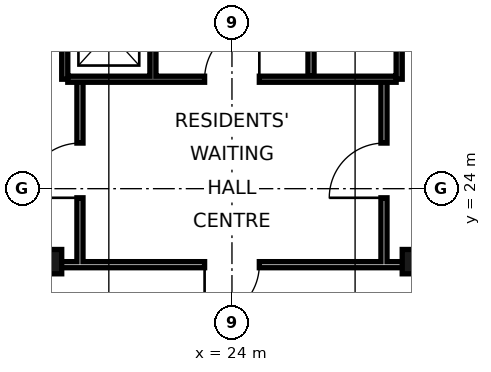
"""IFC4 building model, lengths in metres.
Left out: names, types, materials, properties, quantities, classifications, styles, units other than length and angle.
Written with IfcOpenShell. Run it as: python <this file> out.ifc"""

import sys

from ifc_helpers import new_model, si_unit, direction, frame, frame_2d, origin, origin_2d, place, context, subcontext, project, spatial, rectangle, hollow_rectangle, extrude, element, fill, save


model = new_model("IFC4")
c1 = context("Model", 3, precision=1e-05, world=origin(), true_north=direction((0.0, 1.0)))
c2 = subcontext(c1, "Body", "Model", "MODEL_VIEW")
j1 = project(units=[si_unit("LENGTHUNIT", "METRE"), si_unit("PLANEANGLEUNIT", "RADIAN")], contexts=[c1])
p1 = place(None, origin())
s1 = spatial("IfcSite", under=j1, at=p1, CompositionType="ELEMENT")
p2 = place(p1, origin())
s2 = spatial("IfcBuilding", under=s1, at=p2, CompositionType="ELEMENT")
p3 = place(p2, origin())
s3 = spatial("IfcBuildingStorey", under=s2, at=p3, CompositionType="ELEMENT", Elevation=0.0)
for number, where, z_axis, x_axis in (
    (1, (18.0, 21.6, 0.0), (0.0, 0.0, 1.0), (1.0, 0.0, 0.0)),
    (2, (30.0, 21.6, 0.0), (0.0, 0.0, 1.0), (1.0, 0.0, 0.0)),
):
    element("IfcColumn", number, at=place(p3, frame(where, z_axis=z_axis, x_axis=x_axis)), inside=s3, PredefinedType="COLUMN", context=c2, shape_type="SweptSolid", body=[
        extrude(hollow_rectangle(XDim=0.8, YDim=0.8, WallThickness=0.07, at=origin_2d()), origin(), (0.0, 0.0, 1.0), 15.0),
    ])
for number, where, z_axis, x_axis in (
    (3, (18.5, 27.6, 0.0), (0.0, 0.0, 1.0), (0.0, 1.0, 0.0)),
    (4, (29.5, 27.6, 0.0), (0.0, 0.0, 1.0), (0.0, 1.0, 0.0)),
):
    element("IfcWall", number, at=place(p3, frame(where, z_axis=z_axis, x_axis=x_axis)), inside=s3, PredefinedType="SOLIDWALL", context=c2, shape_type="SweptSolid", body=[
        extrude(rectangle(XDim=17.5, YDim=0.2, at=frame_2d((8.75, 0.0))), origin(), (0.0, 0.0, 1.0), 14.55),
    ])
p4 = place(p3, frame((12.1, 21.5, 0.0), z_axis=(0.0, 0.0, 1.0), x_axis=(1.0, 0.0, 0.0)))
e5 = element("IfcWall", 5, at=p4, inside=s3, PredefinedType="SOLIDWALL", context=c2, shape_type="SweptSolid", body=[
    extrude(rectangle(XDim=23.8, YDim=0.2, at=frame_2d((11.9, 0.0))), origin(), (0.0, 0.0, 1.0), 13.85),
])
p5 = place(p4, frame((2.0, 0.0, 0.0)))
e6 = element("IfcOpeningElement", 6, at=p5, cuts=e5, PredefinedType="OPENING", context=c2, shape_type="SweptSolid", body=[
    extrude(rectangle(XDim=1.8, YDim=2.1, at=frame_2d((0.9, 1.05))), frame((0.0, 0.11, 0.0), z_axis=(0.0, -1.0, 0.0), x_axis=(1.0, 0.0, 0.0)), (0.0, 0.0, 1.0), 0.22),
])
p6 = place(p4, frame((11.0, 0.0, 0.0)))
e7 = element("IfcOpeningElement", 7, at=p6, cuts=e5, PredefinedType="OPENING", context=c2, shape_type="SweptSolid", body=[
    extrude(rectangle(XDim=1.8, YDim=2.1, at=frame_2d((0.9, 1.05))), frame((0.0, 0.11, 0.0), z_axis=(0.0, -1.0, 0.0), x_axis=(1.0, 0.0, 0.0)), (0.0, 0.0, 1.0), 0.22),
])
p7 = place(p4, frame((20.0, 0.0, 0.0)))
e8 = element("IfcOpeningElement", 8, at=p7, cuts=e5, PredefinedType="OPENING", context=c2, shape_type="SweptSolid", body=[
    extrude(rectangle(XDim=1.8, YDim=2.1, at=frame_2d((0.9, 1.05))), frame((0.0, 0.11, 0.0), z_axis=(0.0, -1.0, 0.0), x_axis=(1.0, 0.0, 0.0)), (0.0, 0.0, 1.0), 0.22),
])
p8 = place(p3, frame((19.0, 21.6, 0.0), z_axis=(0.0, 0.0, 1.0), x_axis=(0.0, 1.0, 0.0)))
e9 = element("IfcWall", 9, at=p8, inside=s3, PredefinedType="PARTITIONING", context=c2, shape_type="SweptSolid", body=[
    extrude(rectangle(XDim=6.0, YDim=0.2, at=frame_2d((3.0, 0.0))), origin(), (0.0, 0.0, 1.0), 13.85),
])
p9 = place(p8, frame((2.1, 0.0, 0.0)))
e10 = element("IfcOpeningElement", 10, at=p9, cuts=e9, PredefinedType="OPENING", context=c2, shape_type="SweptSolid", body=[
    extrude(rectangle(XDim=1.8, YDim=2.1, at=frame_2d((0.9, 1.05))), frame((0.0, 0.11, 0.0), z_axis=(0.0, -1.0, 0.0), x_axis=(1.0, 0.0, 0.0)), (0.0, 0.0, 1.0), 0.22),
])
p10 = place(p3, frame((29.0, 21.6, 0.0), z_axis=(0.0, 0.0, 1.0), x_axis=(0.0, 1.0, 0.0)))
e11 = element("IfcWall", 11, at=p10, inside=s3, PredefinedType="PARTITIONING", context=c2, shape_type="SweptSolid", body=[
    extrude(rectangle(XDim=6.0, YDim=0.2, at=frame_2d((3.0, 0.0))), origin(), (0.0, 0.0, 1.0), 13.85),
])
p11 = place(p10, frame((2.1, 0.0, 0.0)))
e12 = element("IfcOpeningElement", 12, at=p11, cuts=e11, PredefinedType="OPENING", context=c2, shape_type="SweptSolid", body=[
    extrude(rectangle(XDim=1.8, YDim=2.1, at=frame_2d((0.9, 1.05))), frame((0.0, 0.11, 0.0), z_axis=(0.0, -1.0, 0.0), x_axis=(1.0, 0.0, 0.0)), (0.0, 0.0, 1.0), 0.22),
])
p12 = place(p3, frame((21.4, 27.7, 0.0), z_axis=(0.0, 0.0, 1.0), x_axis=(0.0, 1.0, 0.0)))
e13 = element("IfcWall", 13, at=p12, inside=s3, PredefinedType="SOLIDWALL", context=c2, shape_type="SweptSolid", body=[
    extrude(rectangle(XDim=17.3, YDim=0.2, at=frame_2d((8.65, 0.0))), origin(), (0.0, 0.0, 1.0), 14.55),
])
p13 = place(p12, frame((0.9, 0.0, 0.0)))
e14 = element("IfcOpeningElement", 14, at=p13, cuts=e13, PredefinedType="OPENING", context=c2, shape_type="SweptSolid", body=[
    extrude(rectangle(XDim=1.1, YDim=2.1, at=frame_2d((0.55, 1.05))), frame((0.0, 0.11, 0.0), z_axis=(0.0, -1.0, 0.0), x_axis=(1.0, 0.0, 0.0)), (0.0, 0.0, 1.0), 0.22),
])
p14 = place(p12, frame((4.0, 0.0, 0.0)))
e15 = element("IfcOpeningElement", 15, at=p14, cuts=e13, PredefinedType="OPENING", context=c2, shape_type="SweptSolid", body=[
    extrude(rectangle(XDim=1.1, YDim=2.1, at=frame_2d((0.55, 1.05))), frame((0.0, 0.11, 0.0), z_axis=(0.0, -1.0, 0.0), x_axis=(1.0, 0.0, 0.0)), (0.0, 0.0, 1.0), 0.22),
])
p15 = place(p12, frame((16.0, 0.0, 0.0)))
e16 = element("IfcOpeningElement", 16, at=p15, cuts=e13, PredefinedType="OPENING", context=c2, shape_type="SweptSolid", body=[
    extrude(rectangle(XDim=1.0, YDim=2.1, at=frame_2d((0.5, 1.05))), frame((0.0, 0.11, 0.0), z_axis=(0.0, -1.0, 0.0), x_axis=(1.0, 0.0, 0.0)), (0.0, 0.0, 1.0), 0.22),
])
p16 = place(p12, frame((7.2, 0.0, 0.0)))
e17 = element("IfcOpeningElement", 17, at=p16, cuts=e13, PredefinedType="OPENING", context=c2, shape_type="SweptSolid", body=[
    extrude(rectangle(XDim=0.9, YDim=2.1, at=frame_2d((0.45, 1.05))), frame((0.0, 0.11, 0.0), z_axis=(0.0, -1.0, 0.0), x_axis=(1.0, 0.0, 0.0)), (0.0, 0.0, 1.0), 0.22),
])
p17 = place(p3, frame((26.6, 27.7, 0.0), z_axis=(0.0, 0.0, 1.0), x_axis=(0.0, 1.0, 0.0)))
e18 = element("IfcWall", 18, at=p17, inside=s3, PredefinedType="SOLIDWALL", context=c2, shape_type="SweptSolid", body=[
    extrude(rectangle(XDim=17.3, YDim=0.2, at=frame_2d((8.65, 0.0))), origin(), (0.0, 0.0, 1.0), 14.55),
])
p18 = place(p17, frame((4.1, 0.0, 0.0)))
e19 = element("IfcOpeningElement", 19, at=p18, cuts=e18, PredefinedType="OPENING", context=c2, shape_type="SweptSolid", body=[
    extrude(rectangle(XDim=0.9, YDim=2.1, at=frame_2d((0.45, 1.05))), frame((0.0, 0.11, 0.0), z_axis=(0.0, -1.0, 0.0), x_axis=(1.0, 0.0, 0.0)), (0.0, 0.0, 1.0), 0.22),
])
p19 = place(p17, frame((10.15, 0.0, 0.0)))
e20 = element("IfcOpeningElement", 20, at=p19, cuts=e18, PredefinedType="OPENING", context=c2, shape_type="SweptSolid", body=[
    extrude(rectangle(XDim=1.0, YDim=2.1, at=frame_2d((0.5, 1.05))), frame((0.0, 0.11, 0.0), z_axis=(0.0, -1.0, 0.0), x_axis=(1.0, 0.0, 0.0)), (0.0, 0.0, 1.0), 0.22),
])
p20 = place(p17, frame((15.275, 0.0, 0.0)))
e21 = element("IfcOpeningElement", 21, at=p20, cuts=e18, PredefinedType="OPENING", context=c2, shape_type="SweptSolid", body=[
    extrude(rectangle(XDim=1.0, YDim=2.1, at=frame_2d((0.5, 1.05))), frame((0.0, 0.11, 0.0), z_axis=(0.0, -1.0, 0.0), x_axis=(1.0, 0.0, 0.0)), (0.0, 0.0, 1.0), 0.22),
])
p21 = place(p3, frame((18.6, 27.6, 0.0), z_axis=(0.0, 0.0, 1.0), x_axis=(1.0, 0.0, 0.0)))
e22 = element("IfcWall", 22, at=p21, inside=s3, PredefinedType="SOLIDWALL", context=c2, shape_type="SweptSolid", body=[
    extrude(rectangle(XDim=10.8, YDim=0.2, at=frame_2d((5.4, 0.0))), origin(), (0.0, 0.0, 1.0), 14.55),
])
p22 = place(p21, frame((4.5, 0.0, 0.0)))
e23 = element("IfcOpeningElement", 23, at=p22, cuts=e22, PredefinedType="OPENING", context=c2, shape_type="SweptSolid", body=[
    extrude(rectangle(XDim=1.8, YDim=2.1, at=frame_2d((0.9, 1.05))), frame((0.0, 0.11, 0.0), z_axis=(0.0, -1.0, 0.0), x_axis=(1.0, 0.0, 0.0)), (0.0, 0.0, 1.0), 0.22),
])
p23 = place(p9, origin())
e24 = element("IfcDoor", 24, at=p23, inside=s3, OperationType="SINGLE_SWING_LEFT", PredefinedType="DOOR", context=c2, shape_type="SweptSolid", body=[
    extrude(rectangle(XDim=1.8, YDim=2.1, at=frame_2d((0.9, 1.05))), frame((0.0, 0.025, 0.0), z_axis=(0.0, -1.0, 0.0), x_axis=(1.0, 0.0, 0.0)), (0.0, 0.0, 1.0), 0.05),
])
fill(e10, e24)
p24 = place(p6, frame((1.8, 0.0, 0.0), z_axis=(0.0, 0.0, 1.0), x_axis=(-1.0, 0.0, 0.0)))
e25 = element("IfcDoor", 25, at=p24, inside=s3, OperationType="SINGLE_SWING_RIGHT", PredefinedType="DOOR", context=c2, shape_type="SweptSolid", body=[
    extrude(rectangle(XDim=1.8, YDim=2.1, at=frame_2d((0.9, 1.05))), frame((0.0, 0.025, 0.0), z_axis=(0.0, -1.0, 0.0), x_axis=(1.0, 0.0, 0.0)), (0.0, 0.0, 1.0), 0.05),
])
fill(e7, e25)
p25 = place(p11, origin())
e26 = element("IfcDoor", 26, at=p25, inside=s3, OperationType="SINGLE_SWING_LEFT", PredefinedType="DOOR", context=c2, shape_type="SweptSolid", body=[
    extrude(rectangle(XDim=1.8, YDim=2.1, at=frame_2d((0.9, 1.05))), frame((0.0, 0.025, 0.0), z_axis=(0.0, -1.0, 0.0), x_axis=(1.0, 0.0, 0.0)), (0.0, 0.0, 1.0), 0.05),
])
fill(e12, e26)
p26 = place(p22, frame((1.8, 0.0, 0.0), z_axis=(0.0, 0.0, 1.0), x_axis=(-1.0, 0.0, 0.0)))
e27 = element("IfcDoor", 27, at=p26, inside=s3, OperationType="SINGLE_SWING_LEFT", PredefinedType="DOOR", context=c2, shape_type="SweptSolid", body=[
    extrude(rectangle(XDim=1.8, YDim=2.1, at=frame_2d((0.9, 1.05))), frame((0.0, 0.025, 0.0), z_axis=(0.0, -1.0, 0.0), x_axis=(1.0, 0.0, 0.0)), (0.0, 0.0, 1.0), 0.05),
])
fill(e23, e27)
save(model, sys.argv[1])
